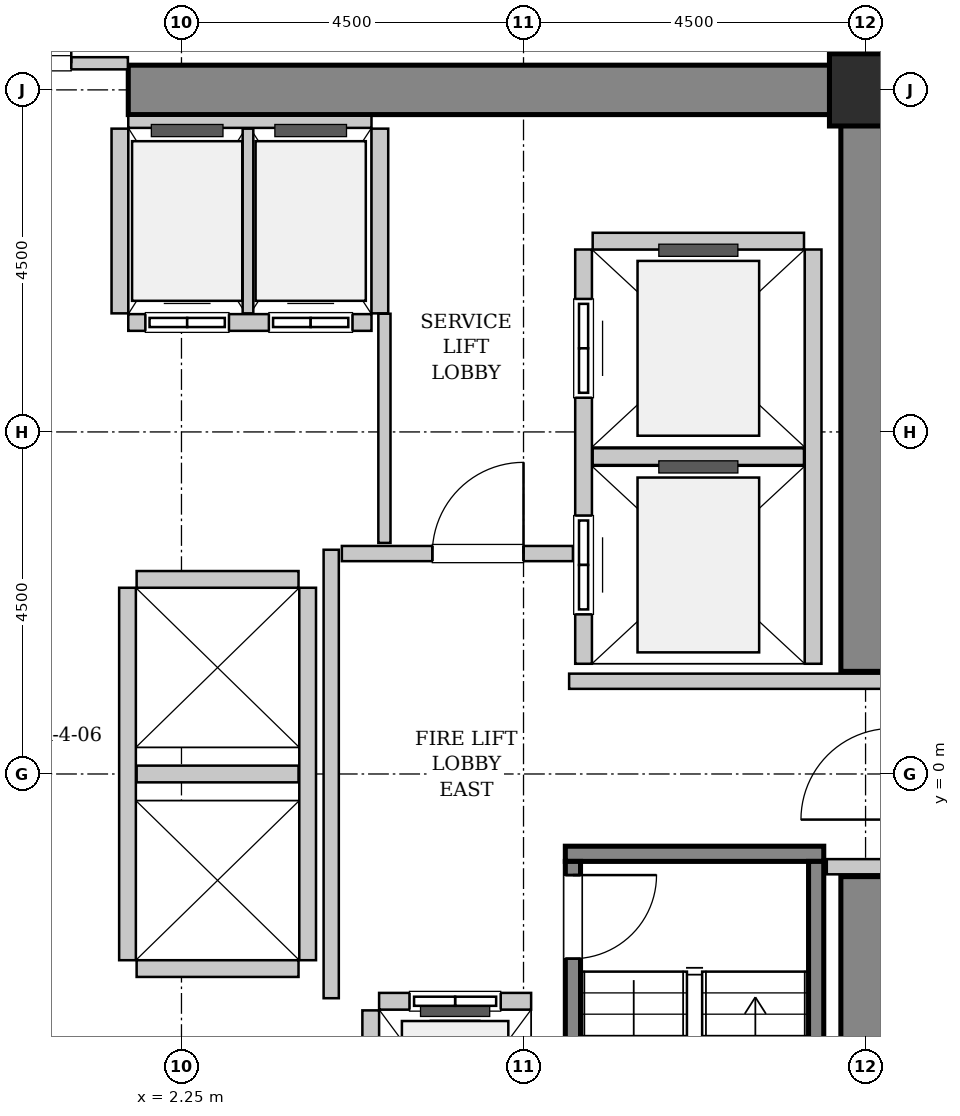
"""IFC4 building model, lengths in metres.
Left out: names, types, materials, properties, quantities, classifications, styles, units other than length and angle.
Written with IfcOpenShell. Run it as: python <this file> out.ifc"""

import sys

from ifc_helpers import new_model, si_unit, direction, frame, frame_2d, origin, origin_2d, place, context, subcontext, project, spatial, rectangle, hollow_rectangle, extrude, source, transform, mapped, element, fill, save


model = new_model("IFC4")
c1 = context("Model", 3, precision=1e-05, world=origin(), true_north=direction((0.0, 1.0)))
c2 = subcontext(c1, "Body", "Model", "MODEL_VIEW")
j1 = project(units=[si_unit("LENGTHUNIT", "METRE"), si_unit("PLANEANGLEUNIT", "RADIAN")], contexts=[c1])
p1 = place(None, origin())
s1 = spatial("IfcSite", under=j1, at=p1, CompositionType="ELEMENT")
p2 = place(p1, origin())
s2 = spatial("IfcBuilding", under=s1, at=p2, CompositionType="ELEMENT")
p3 = place(p2, frame((0.0, 0.0, 78.6)))
s3 = spatial("IfcBuildingStorey", under=s2, at=p3, CompositionType="ELEMENT", Elevation=78.6)
m1 = source(origin(), c2, "Body", "SweptSolid", [
    extrude(rectangle(XDim=10.025, YDim=0.65, at=frame_2d((5.012, 0.0))), origin(), (0.0, 0.0, 1.0), 3.8),
])
p4 = place(p3, frame((1.55, 9.0, 0.0), z_axis=(0.0, 0.0, 1.0), x_axis=(1.0, 0.0, 0.0)))
e1 = element("IfcWall", 1, at=p4, inside=s3, PredefinedType="SHEAR", context=c2, shape_type="MappedRepresentation", body=[
    mapped(m1, transform((0.0, 0.0, 0.0), x_axis=(1.0, 0.0, 0.0), y_axis=(0.0, 1.0, 0.0), z_axis=(0.0, 0.0, 1.0), scale=1.0)),
])
m2 = source(origin(), c2, "Body", "SweptSolid", [
    extrude(rectangle(XDim=7.325, YDim=0.65, at=frame_2d((3.663, 0.0))), origin(), (0.0, 0.0, 1.0), 3.8),
])
for number, where, z_axis, x_axis in (
    (2, (11.25, -8.675, 0.0), (0.0, 0.0, 1.0), (0.0, 1.0, 0.0)),
    (3, (11.25, 1.35, 0.0), (0.0, 0.0, 1.0), (0.0, 1.0, 0.0)),
):
    element("IfcWall", number, at=place(p3, frame(where, z_axis=z_axis, x_axis=x_axis)), inside=s3, PredefinedType="SHEAR", context=c2, shape_type="MappedRepresentation", body=[
        mapped(m2, transform((0.0, 0.0, 0.0), x_axis=(1.0, 0.0, 0.0), y_axis=(0.0, 1.0, 0.0), z_axis=(0.0, 0.0, 1.0), scale=1.0)),
    ])
m3 = source(origin(), c2, "Body", "SweptSolid", [
    extrude(hollow_rectangle(XDim=0.95, YDim=0.95, WallThickness=0.045, InnerFilletRadius=0.045, OuterFilletRadius=0.09, at=origin_2d()), origin(), (0.0, 0.0, 1.0), 3.8),
])
p5 = place(p3, frame((11.25, 9.0, 0.0), z_axis=(0.0, 0.0, 1.0), x_axis=(1.0, 0.0, 0.0)))
e4 = element("IfcColumn", 4, at=p5, inside=s3, PredefinedType="COLUMN", context=c2, shape_type="MappedRepresentation", body=[
    mapped(m3, transform((0.0, 0.0, 0.0), x_axis=(1.0, 0.0, 0.0), y_axis=(0.0, 1.0, 0.0), z_axis=(0.0, 0.0, 1.0), scale=1.0)),
])
m4 = source(origin(), c2, "Body", "SweptSolid", [
    extrude(rectangle(XDim=3.4, YDim=0.2, at=frame_2d((1.7, 0.0))), origin(), (0.0, 0.0, 1.0), 3.8),
])
p6 = place(p3, frame((7.3, -1.05, 0.0), z_axis=(0.0, 0.0, 1.0), x_axis=(1.0, 0.0, 0.0)))
e5 = element("IfcWall", 5, at=p6, inside=s3, PredefinedType="SOLIDWALL", context=c2, shape_type="MappedRepresentation", body=[
    mapped(m4, transform((0.0, 0.0, 0.0), x_axis=(1.0, 0.0, 0.0), y_axis=(0.0, 1.0, 0.0), z_axis=(0.0, 0.0, 1.0), scale=1.0)),
])
m5 = source(origin(), c2, "Body", "SweptSolid", [
    extrude(rectangle(XDim=7.1, YDim=0.2, at=frame_2d((3.55, 0.0))), origin(), (0.0, 0.0, 1.0), 3.8),
])
p7 = place(p3, frame((7.4, -1.15, 0.0), z_axis=(0.0, 0.0, 1.0), x_axis=(0.0, -1.0, 0.0)))
e6 = element("IfcWall", 6, at=p7, inside=s3, PredefinedType="SOLIDWALL", context=c2, shape_type="MappedRepresentation", body=[
    mapped(m5, transform((0.0, 0.0, 0.0), x_axis=(1.0, 0.0, 0.0), y_axis=(0.0, 1.0, 0.0), z_axis=(0.0, 0.0, 1.0), scale=1.0)),
])
p8 = place(p7, frame((0.18, 0.0, 0.0)))
e7 = element("IfcOpeningElement", 7, at=p8, cuts=e6, PredefinedType="OPENING", context=c2, shape_type="SweptSolid", body=[
    extrude(rectangle(XDim=1.1, YDim=2.15, at=frame_2d((0.55, 1.075))), frame((0.0, 0.11, 0.0), z_axis=(0.0, -1.0, 0.0), x_axis=(1.0, 0.0, 0.0)), (0.0, 0.0, 1.0), 0.22),
])
p9 = place(p3, frame((10.6, -1.15, 0.0), z_axis=(0.0, 0.0, 1.0), x_axis=(0.0, -1.0, 0.0)))
e8 = element("IfcWall", 8, at=p9, inside=s3, PredefinedType="SOLIDWALL", context=c2, shape_type="MappedRepresentation", body=[
    mapped(m5, transform((0.0, 0.0, 0.0), x_axis=(1.0, 0.0, 0.0), y_axis=(0.0, 1.0, 0.0), z_axis=(0.0, 0.0, 1.0), scale=1.0)),
])
m6 = source(origin(), c2, "Body", "SweptSolid", [
    extrude(rectangle(XDim=2.0, YDim=0.22, at=frame_2d((1.0, 0.0))), origin(), (0.0, 0.0, 1.0), 3.535),
])
p10 = place(p3, frame((6.85, -2.99, 0.0), z_axis=(0.0, 0.0, 1.0), x_axis=(-1.0, 0.0, 0.0)))
e9 = element("IfcWall", 9, at=p10, inside=s3, PredefinedType="SOLIDWALL", context=c2, shape_type="MappedRepresentation", body=[
    mapped(m6, transform((0.0, 0.0, 0.0), x_axis=(1.0, 0.0, 0.0), y_axis=(0.0, 1.0, 0.0), z_axis=(0.0, 0.0, 1.0), scale=1.0)),
])
p11 = place(p10, frame((0.4, 0.0, 0.0)))
e10 = element("IfcOpeningElement", 10, at=p11, cuts=e9, PredefinedType="OPENING", context=c2, shape_type="SweptSolid", body=[
    extrude(rectangle(XDim=1.2, YDim=2.2, at=frame_2d((0.6, 1.1))), frame((0.0, 0.12, 0.0), z_axis=(0.0, -1.0, 0.0), x_axis=(1.0, 0.0, 0.0)), (0.0, 0.0, 1.0), 0.24),
])
m7 = source(origin(), c2, "Body", "SweptSolid", [
    extrude(rectangle(XDim=2.68, YDim=0.22, at=frame_2d((1.34, 0.0))), origin(), (0.0, 0.0, 1.0), 3.535),
])
p12 = place(p3, frame((4.74, -3.11, 0.0), z_axis=(0.0, 0.0, 1.0), x_axis=(0.0, -1.0, 0.0)))
e11 = element("IfcWall", 11, at=p12, inside=s3, PredefinedType="SOLIDWALL", context=c2, shape_type="MappedRepresentation", body=[
    mapped(m7, transform((0.0, 0.0, 0.0), x_axis=(1.0, 0.0, 0.0), y_axis=(0.0, 1.0, 0.0), z_axis=(0.0, 0.0, 1.0), scale=1.0)),
])
m8 = source(origin(), c2, "Body", "SweptSolid", [
    extrude(rectangle(XDim=5.45, YDim=0.22, at=frame_2d((2.725, 0.0))), origin(), (0.0, 0.0, 1.0), 3.535),
])
p13 = place(p3, frame((7.54, 6.9, 0.0), z_axis=(0.0, 0.0, 1.0), x_axis=(0.0, -1.0, 0.0)))
e12 = element("IfcWall", 12, at=p13, inside=s3, PredefinedType="SOLIDWALL", context=c2, shape_type="MappedRepresentation", body=[
    mapped(m8, transform((0.0, 0.0, 0.0), x_axis=(1.0, 0.0, 0.0), y_axis=(0.0, 1.0, 0.0), z_axis=(0.0, 0.0, 1.0), scale=1.0)),
])
p14 = place(p13, frame((3.5, 0.0, 0.0)))
e13 = element("IfcOpeningElement", 13, at=p14, cuts=e12, PredefinedType="OPENING", context=c2, shape_type="SweptSolid", body=[
    extrude(rectangle(XDim=1.3, YDim=2.3, at=frame_2d((0.65, 1.15))), frame((0.0, 0.12, 0.0), z_axis=(0.0, -1.0, 0.0), x_axis=(1.0, 0.0, 0.0)), (0.0, 0.0, 1.0), 0.24),
])
p15 = place(p13, frame((0.65, 0.0, 0.0)))
e14 = element("IfcOpeningElement", 14, at=p15, cuts=e12, PredefinedType="OPENING", context=c2, shape_type="SweptSolid", body=[
    extrude(rectangle(XDim=1.3, YDim=2.3, at=frame_2d((0.65, 1.15))), frame((0.0, 0.12, 0.0), z_axis=(0.0, -1.0, 0.0), x_axis=(1.0, 0.0, 0.0)), (0.0, 0.0, 1.0), 0.24),
])
p16 = place(p3, frame((10.56, 1.45, 0.0), z_axis=(0.0, 0.0, 1.0), x_axis=(0.0, 1.0, 0.0)))
e15 = element("IfcWall", 15, at=p16, inside=s3, PredefinedType="SOLIDWALL", context=c2, shape_type="MappedRepresentation", body=[
    mapped(m8, transform((0.0, 0.0, 0.0), x_axis=(1.0, 0.0, 0.0), y_axis=(0.0, 1.0, 0.0), z_axis=(0.0, 0.0, 1.0), scale=1.0)),
])
m9 = source(origin(), c2, "Body", "SweptSolid", [
    extrude(rectangle(XDim=2.78, YDim=0.22, at=frame_2d((1.39, 0.0))), origin(), (0.0, 0.0, 1.0), 3.535),
])
for number, where, z_axis, x_axis in (
    (16, (7.66, 4.175, 0.0), (0.0, 0.0, 1.0), (1.0, 0.0, 0.0)),
    (17, (10.44, 7.01, 0.0), (0.0, 0.0, 1.0), (-1.0, 0.0, 0.0)),
):
    element("IfcWall", number, at=place(p3, frame(where, z_axis=z_axis, x_axis=x_axis)), inside=s3, PredefinedType="SOLIDWALL", context=c2, shape_type="MappedRepresentation", body=[
        mapped(m9, transform((0.0, 0.0, 0.0), x_axis=(1.0, 0.0, 0.0), y_axis=(0.0, 1.0, 0.0), z_axis=(0.0, 0.0, 1.0), scale=1.0)),
    ])
m10 = source(origin(), c2, "Body", "SweptSolid", [
    extrude(rectangle(XDim=3.2, YDim=0.22, at=frame_2d((1.6, 0.0))), origin(), (0.0, 0.0, 1.0), 3.535),
])
p17 = place(p3, frame((1.55, 5.94, 0.0), z_axis=(0.0, 0.0, 1.0), x_axis=(1.0, 0.0, 0.0)))
e18 = element("IfcWall", 18, at=p17, inside=s3, PredefinedType="SOLIDWALL", context=c2, shape_type="MappedRepresentation", body=[
    mapped(m10, transform((0.0, 0.0, 0.0), x_axis=(1.0, 0.0, 0.0), y_axis=(0.0, 1.0, 0.0), z_axis=(0.0, 0.0, 1.0), scale=1.0)),
])
p18 = place(p17, frame((0.225, 0.0, 0.0)))
e19 = element("IfcOpeningElement", 19, at=p18, cuts=e18, PredefinedType="OPENING", context=c2, shape_type="SweptSolid", body=[
    extrude(rectangle(XDim=1.1, YDim=2.2, at=frame_2d((0.55, 1.1))), frame((0.0, 0.12, 0.0), z_axis=(0.0, -1.0, 0.0), x_axis=(1.0, 0.0, 0.0)), (0.0, 0.0, 1.0), 0.24),
])
p19 = place(p17, frame((1.85, 0.0, 0.0)))
e20 = element("IfcOpeningElement", 20, at=p19, cuts=e18, PredefinedType="OPENING", context=c2, shape_type="SweptSolid", body=[
    extrude(rectangle(XDim=1.1, YDim=2.2, at=frame_2d((0.55, 1.1))), frame((0.0, 0.12, 0.0), z_axis=(0.0, -1.0, 0.0), x_axis=(1.0, 0.0, 0.0)), (0.0, 0.0, 1.0), 0.24),
])
m11 = source(origin(), c2, "Body", "SweptSolid", [
    extrude(rectangle(XDim=3.2, YDim=0.16, at=frame_2d((1.6, 0.0))), origin(), (0.0, 0.0, 1.0), 2.425),
])
p20 = place(p3, frame((4.75, 8.58, 0.0), z_axis=(0.0, 0.0, 1.0), x_axis=(-1.0, 0.0, 0.0)))
e21 = element("IfcWall", 21, at=p20, inside=s3, PredefinedType="PARTITIONING", context=c2, shape_type="MappedRepresentation", body=[
    mapped(m11, transform((0.0, 0.0, 0.0), x_axis=(1.0, 0.0, 0.0), y_axis=(0.0, 1.0, 0.0), z_axis=(0.0, 0.0, 1.0), scale=1.0)),
])
m12 = source(origin(), c2, "Body", "SweptSolid", [
    extrude(rectangle(XDim=2.43, YDim=0.22, at=frame_2d((1.215, 0.0))), origin(), (0.0, 0.0, 1.0), 3.535),
])
p21 = place(p3, frame((1.44, 8.49, 0.0), z_axis=(0.0, 0.0, 1.0), x_axis=(0.0, -1.0, 0.0)))
e22 = element("IfcWall", 22, at=p21, inside=s3, PredefinedType="SOLIDWALL", context=c2, shape_type="MappedRepresentation", body=[
    mapped(m12, transform((0.0, 0.0, 0.0), x_axis=(1.0, 0.0, 0.0), y_axis=(0.0, 1.0, 0.0), z_axis=(0.0, 0.0, 1.0), scale=1.0)),
])
m13 = source(origin(), c2, "Body", "SweptSolid", [
    extrude(rectangle(XDim=2.43, YDim=0.14, at=frame_2d((1.215, 0.0))), origin(), (0.0, 0.0, 1.0), 3.535),
])
p22 = place(p3, frame((3.125, 6.06, 0.0), z_axis=(0.0, 0.0, 1.0), x_axis=(0.0, 1.0, 0.0)))
e23 = element("IfcWall", 23, at=p22, inside=s3, PredefinedType="PARTITIONING", context=c2, shape_type="MappedRepresentation", body=[
    mapped(m13, transform((0.0, 0.0, 0.0), x_axis=(1.0, 0.0, 0.0), y_axis=(0.0, 1.0, 0.0), z_axis=(0.0, 0.0, 1.0), scale=1.0)),
])
p23 = place(p3, frame((4.86, 6.06, 0.0), z_axis=(0.0, 0.0, 1.0), x_axis=(0.0, 1.0, 0.0)))
e24 = element("IfcWall", 24, at=p23, inside=s3, PredefinedType="SOLIDWALL", context=c2, shape_type="MappedRepresentation", body=[
    mapped(m12, transform((0.0, 0.0, 0.0), x_axis=(1.0, 0.0, 0.0), y_axis=(0.0, 1.0, 0.0), z_axis=(0.0, 0.0, 1.0), scale=1.0)),
])
m14 = source(origin(), c2, "Body", "SweptSolid", [
    extrude(rectangle(XDim=4.9, YDim=0.22, at=frame_2d((2.45, 0.0))), origin(), (0.0, 0.0, 1.0), 3.535),
])
for number, where, z_axis, x_axis in (
    (25, (1.54, 2.45, 0.0), (0.0, 0.0, 1.0), (0.0, -1.0, 0.0)),
    (26, (3.91, -2.45, 0.0), (0.0, 0.0, 1.0), (0.0, 1.0, 0.0)),
):
    element("IfcWall", number, at=place(p3, frame(where, z_axis=z_axis, x_axis=x_axis)), inside=s3, PredefinedType="SOLIDWALL", context=c2, shape_type="MappedRepresentation", body=[
        mapped(m14, transform((0.0, 0.0, 0.0), x_axis=(1.0, 0.0, 0.0), y_axis=(0.0, 1.0, 0.0), z_axis=(0.0, 0.0, 1.0), scale=1.0)),
    ])
m15 = source(origin(), c2, "Body", "SweptSolid", [
    extrude(rectangle(XDim=2.13, YDim=0.22, at=frame_2d((1.065, 0.0))), origin(), (0.0, 0.0, 1.0), 3.535),
])
for number, where, z_axis, x_axis in (
    (27, (1.66, -2.56, 0.0), (0.0, 0.0, 1.0), (1.0, 0.0, 0.0)),
    (28, (1.66, 0.0, 0.0), (0.0, 0.0, 1.0), (1.0, 0.0, 0.0)),
    (29, (3.79, 2.56, 0.0), (0.0, 0.0, 1.0), (-1.0, 0.0, 0.0)),
):
    element("IfcWall", number, at=place(p3, frame(where, z_axis=z_axis, x_axis=x_axis)), inside=s3, PredefinedType="SOLIDWALL", context=c2, shape_type="MappedRepresentation", body=[
        mapped(m15, transform((0.0, 0.0, 0.0), x_axis=(1.0, 0.0, 0.0), y_axis=(0.0, 1.0, 0.0), z_axis=(0.0, 0.0, 1.0), scale=1.0)),
    ])
m16 = source(origin(), c2, "Body", "SweptSolid", [
    extrude(rectangle(XDim=5.9, YDim=0.2, at=frame_2d((2.95, 0.0))), origin(), (0.0, 0.0, 1.0), 3.535),
])
p24 = place(p3, frame((4.22, -2.95, 0.0), z_axis=(0.0, 0.0, 1.0), x_axis=(0.0, 1.0, 0.0)))
e30 = element("IfcWall", 30, at=p24, inside=s3, PredefinedType="PARTITIONING", context=c2, shape_type="MappedRepresentation", body=[
    mapped(m16, transform((0.0, 0.0, 0.0), x_axis=(1.0, 0.0, 0.0), y_axis=(0.0, 1.0, 0.0), z_axis=(0.0, 0.0, 1.0), scale=1.0)),
])
m17 = source(origin(), c2, "Body", "SweptSolid", [
    extrude(rectangle(XDim=3.04, YDim=0.2, at=frame_2d((1.52, 0.0))), origin(), (0.0, 0.0, 1.0), 3.535),
])
p25 = place(p3, frame((4.36, 2.9, 0.0), z_axis=(0.0, 0.0, 1.0), x_axis=(1.0, 0.0, 0.0)))
e31 = element("IfcWall", 31, at=p25, inside=s3, PredefinedType="PARTITIONING", context=c2, shape_type="MappedRepresentation", body=[
    mapped(m17, transform((0.0, 0.0, 0.0), x_axis=(1.0, 0.0, 0.0), y_axis=(0.0, 1.0, 0.0), z_axis=(0.0, 0.0, 1.0), scale=1.0)),
])
p26 = place(p25, frame((1.19, 0.0, 0.0)))
e32 = element("IfcOpeningElement", 32, at=p26, cuts=e31, PredefinedType="OPENING", context=c2, shape_type="SweptSolid", body=[
    extrude(rectangle(XDim=1.2, YDim=2.15, at=frame_2d((0.6, 1.075))), frame((0.0, 0.11, 0.0), z_axis=(0.0, -1.0, 0.0), x_axis=(1.0, 0.0, 0.0)), (0.0, 0.0, 1.0), 0.22),
])
m18 = source(origin(), c2, "Body", "SweptSolid", [
    extrude(rectangle(XDim=4.11, YDim=0.2, at=frame_2d((2.055, 0.0))), origin(), (0.0, 0.0, 1.0), 3.535),
])
p27 = place(p3, frame((7.35, 1.22, 0.0), z_axis=(0.0, 0.0, 1.0), x_axis=(1.0, 0.0, 0.0)))
e33 = element("IfcWall", 33, at=p27, inside=s3, PredefinedType="PARTITIONING", context=c2, shape_type="MappedRepresentation", body=[
    mapped(m18, transform((0.0, 0.0, 0.0), x_axis=(1.0, 0.0, 0.0), y_axis=(0.0, 1.0, 0.0), z_axis=(0.0, 0.0, 1.0), scale=1.0)),
])
m19 = source(origin(), c2, "Body", "SweptSolid", [
    extrude(rectangle(XDim=0.72, YDim=0.2, at=frame_2d((0.36, 0.0))), origin(), (0.0, 0.0, 1.0), 3.535),
])
p28 = place(p3, frame((10.74, -1.22, 0.0), z_axis=(0.0, 0.0, 1.0), x_axis=(1.0, 0.0, 0.0)))
e34 = element("IfcWall", 34, at=p28, inside=s3, PredefinedType="PARTITIONING", context=c2, shape_type="MappedRepresentation", body=[
    mapped(m19, transform((0.0, 0.0, 0.0), x_axis=(1.0, 0.0, 0.0), y_axis=(0.0, 1.0, 0.0), z_axis=(0.0, 0.0, 1.0), scale=1.0)),
])
m20 = source(origin(), c2, "Body", "SweptSolid", [
    extrude(rectangle(XDim=3.09, YDim=0.16, at=frame_2d((1.545, 0.0))), origin(), (0.0, 0.0, 1.0), 2.425),
])
p29 = place(p3, frame((-1.545, 9.35, 0.0), z_axis=(0.0, 0.0, 1.0), x_axis=(1.0, 0.0, 0.0)))
e35 = element("IfcWall", 35, at=p29, inside=s3, PredefinedType="PARTITIONING", context=c2, shape_type="MappedRepresentation", body=[
    mapped(m20, transform((0.0, 0.0, 0.0), x_axis=(1.0, 0.0, 0.0), y_axis=(0.0, 1.0, 0.0), z_axis=(0.0, 0.0, 1.0), scale=1.0)),
])
p30 = place(p29, frame((0.745, 0.0, 0.0)))
e36 = element("IfcOpeningElement", 36, at=p30, cuts=e35, PredefinedType="OPENING", context=c2, shape_type="SweptSolid", body=[
    extrude(rectangle(XDim=1.6, YDim=2.3, at=frame_2d((0.8, 1.15))), frame((0.0, 0.09, 0.0), z_axis=(0.0, -1.0, 0.0), x_axis=(1.0, 0.0, 0.0)), (0.0, 0.0, 1.0), 0.18),
])
m21 = source(origin(), c2, "Body", "SweptSolid", [
    extrude(rectangle(XDim=3.015, YDim=0.16, at=frame_2d((1.507, 0.0))), origin(), (0.0, 0.0, 1.0), 3.535),
])
p31 = place(p3, frame((4.92, 3.04, 0.0), z_axis=(0.0, 0.0, 1.0), x_axis=(0.0, 1.0, 0.0)))
e37 = element("IfcWall", 37, at=p31, inside=s3, PredefinedType="PARTITIONING", context=c2, shape_type="MappedRepresentation", body=[
    mapped(m21, transform((0.0, 0.0, 0.0), x_axis=(1.0, 0.0, 0.0), y_axis=(0.0, 1.0, 0.0), z_axis=(0.0, 0.0, 1.0), scale=1.0)),
])
m22 = source(origin(), c2, "Body", "SweptSolid", [
    extrude(rectangle(XDim=1.1, YDim=2.15, at=frame_2d((0.55, 1.075))), frame((0.0, 0.025, 0.0), z_axis=(0.0, -1.0, 0.0), x_axis=(1.0, 0.0, 0.0)), (0.0, 0.0, 1.0), 0.05),
])
p32 = place(p8, origin())
e38 = element("IfcDoor", 38, at=p32, inside=s3, OperationType="SINGLE_SWING_LEFT", PredefinedType="DOOR", context=c2, shape_type="MappedRepresentation", body=[
    mapped(m22, transform((0.0, 0.0, 0.0), x_axis=(1.0, 0.0, 0.0), y_axis=(0.0, 1.0, 0.0), z_axis=(0.0, 0.0, 1.0), scale=1.0)),
])
fill(e7, e38)
m23 = source(origin(), c2, "Body", "SweptSolid", [
    extrude(rectangle(XDim=1.2, YDim=2.2, at=frame_2d((0.6, 1.1))), frame((0.0, 0.025, 0.0), z_axis=(0.0, -1.0, 0.0), x_axis=(1.0, 0.0, 0.0)), (0.0, 0.0, 1.0), 0.05),
])
p33 = place(p11, origin())
e39 = element("IfcDoor", 39, at=p33, inside=s3, OperationType="SLIDING_TO_LEFT", PredefinedType="DOOR", context=c2, shape_type="MappedRepresentation", body=[
    mapped(m23, transform((0.0, 0.0, 0.0), x_axis=(1.0, 0.0, 0.0), y_axis=(0.0, 1.0, 0.0), z_axis=(0.0, 0.0, 1.0), scale=1.0)),
])
fill(e10, e39)
m24 = source(origin(), c2, "Body", "SweptSolid", [
    extrude(rectangle(XDim=1.3, YDim=2.3, at=frame_2d((0.65, 1.15))), frame((0.0, 0.025, 0.0), z_axis=(0.0, -1.0, 0.0), x_axis=(1.0, 0.0, 0.0)), (0.0, 0.0, 1.0), 0.05),
])
p34 = place(p14, origin())
e40 = element("IfcDoor", 40, at=p34, inside=s3, OperationType="SLIDING_TO_RIGHT", PredefinedType="DOOR", context=c2, shape_type="MappedRepresentation", body=[
    mapped(m24, transform((0.0, 0.0, 0.0), x_axis=(1.0, 0.0, 0.0), y_axis=(0.0, 1.0, 0.0), z_axis=(0.0, 0.0, 1.0), scale=1.0)),
])
fill(e13, e40)
p35 = place(p15, origin())
e41 = element("IfcDoor", 41, at=p35, inside=s3, OperationType="SLIDING_TO_RIGHT", PredefinedType="DOOR", context=c2, shape_type="MappedRepresentation", body=[
    mapped(m24, transform((0.0, 0.0, 0.0), x_axis=(1.0, 0.0, 0.0), y_axis=(0.0, 1.0, 0.0), z_axis=(0.0, 0.0, 1.0), scale=1.0)),
])
fill(e14, e41)
m25 = source(origin(), c2, "Body", "SweptSolid", [
    extrude(rectangle(XDim=1.1, YDim=2.2, at=frame_2d((0.55, 1.1))), frame((0.0, 0.025, 0.0), z_axis=(0.0, -1.0, 0.0), x_axis=(1.0, 0.0, 0.0)), (0.0, 0.0, 1.0), 0.05),
])
p36 = place(p18, origin())
e42 = element("IfcDoor", 42, at=p36, inside=s3, OperationType="DOUBLE_DOOR_SLIDING", PredefinedType="DOOR", context=c2, shape_type="MappedRepresentation", body=[
    mapped(m25, transform((0.0, 0.0, 0.0), x_axis=(1.0, 0.0, 0.0), y_axis=(0.0, 1.0, 0.0), z_axis=(0.0, 0.0, 1.0), scale=1.0)),
])
fill(e19, e42)
p37 = place(p19, origin())
e43 = element("IfcDoor", 43, at=p37, inside=s3, OperationType="DOUBLE_DOOR_SLIDING", PredefinedType="DOOR", context=c2, shape_type="MappedRepresentation", body=[
    mapped(m25, transform((0.0, 0.0, 0.0), x_axis=(1.0, 0.0, 0.0), y_axis=(0.0, 1.0, 0.0), z_axis=(0.0, 0.0, 1.0), scale=1.0)),
])
fill(e20, e43)
m26 = source(origin(), c2, "Body", "SweptSolid", [
    extrude(rectangle(XDim=1.2, YDim=2.15, at=frame_2d((0.6, 1.075))), frame((0.0, 0.025, 0.0), z_axis=(0.0, -1.0, 0.0), x_axis=(1.0, 0.0, 0.0)), (0.0, 0.0, 1.0), 0.05),
])
p38 = place(p26, origin())
e44 = element("IfcDoor", 44, at=p38, inside=s3, OperationType="SINGLE_SWING_RIGHT", PredefinedType="DOOR", context=c2, shape_type="MappedRepresentation", body=[
    mapped(m26, transform((0.0, 0.0, 0.0), x_axis=(1.0, 0.0, 0.0), y_axis=(0.0, 1.0, 0.0), z_axis=(0.0, 0.0, 1.0), scale=1.0)),
])
fill(e32, e44)
m27 = source(origin(), c2, "Body", "SweptSolid", [
    extrude(rectangle(XDim=1.6, YDim=2.3, at=frame_2d((0.8, 1.15))), frame((0.0, 0.025, 0.0), z_axis=(0.0, -1.0, 0.0), x_axis=(1.0, 0.0, 0.0)), (0.0, 0.0, 1.0), 0.05),
])
p39 = place(p30, origin())
e45 = element("IfcDoor", 45, at=p39, inside=s3, OperationType="DOUBLE_DOOR_SINGLE_SWING", PredefinedType="DOOR", context=c2, shape_type="MappedRepresentation", body=[
    mapped(m27, transform((0.0, 0.0, 0.0), x_axis=(1.0, 0.0, 0.0), y_axis=(0.0, 1.0, 0.0), z_axis=(0.0, 0.0, 1.0), scale=1.0)),
])
fill(e36, e45)
save(model, sys.argv[1])
